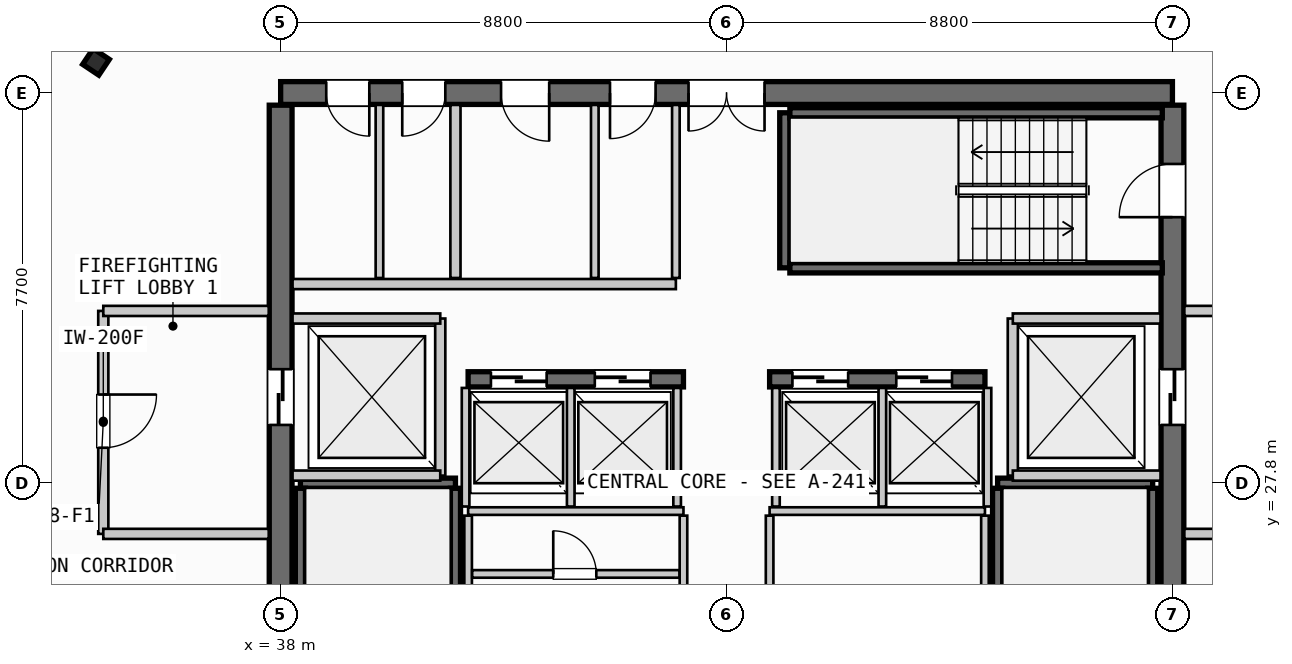
"""IFC4 building model, lengths in metres.
Left out: names, types, materials, properties, quantities, classifications, styles, units other than length and angle.
Written with IfcOpenShell. Run it as: python <this file> out.ifc"""

import sys

from ifc_helpers import new_model, si_unit, direction, frame, frame_2d, origin, origin_2d, place, context, subcontext, project, spatial, rectangle, i_section, extrude, source, transform, mapped, element, fill, save


model = new_model("IFC4")
c1 = context("Model", 3, precision=1e-05, world=origin(), true_north=direction((0.0, 1.0)))
c2 = subcontext(c1, "Body", "Model", "MODEL_VIEW")
j1 = project(units=[si_unit("LENGTHUNIT", "METRE"), si_unit("PLANEANGLEUNIT", "RADIAN")], contexts=[c1])
p1 = place(None, origin())
s1 = spatial("IfcSite", under=j1, at=p1, CompositionType="ELEMENT")
p2 = place(p1, origin())
s2 = spatial("IfcBuilding", under=s1, at=p2, CompositionType="ELEMENT")
p3 = place(p2, frame((0.0, 0.0, 293.95)))
s3 = spatial("IfcBuildingStorey", under=s2, at=p3, CompositionType="ELEMENT", Elevation=293.95)
p4 = place(p3, frame((55.6, 35.5, 0.0), z_axis=(0.0, 0.0, 1.0), x_axis=(-1.0, 0.0, 0.0)))
e1 = element("IfcWall", 1, at=p4, inside=s3, PredefinedType="SHEAR", context=c2, shape_type="SweptSolid", body=[
    extrude(rectangle(XDim=17.6, YDim=0.45, at=frame_2d((8.8, 0.0))), origin(), (0.0, 0.0, 1.0), 3.21),
])
p5 = place(p4, frame((8.05, 0.0, 0.0)))
e2 = element("IfcOpeningElement", 2, at=p5, cuts=e1, PredefinedType="OPENING", context=c2, shape_type="SweptSolid", body=[
    extrude(rectangle(XDim=1.5, YDim=2.2, at=frame_2d((0.75, 1.1))), frame((0.0, 0.235, 0.0), z_axis=(0.0, -1.0, 0.0), x_axis=(1.0, 0.0, 0.0)), (0.0, 0.0, 1.0), 0.47),
])
p6 = place(p4, frame((15.85, 0.0, 0.0)))
e3 = element("IfcOpeningElement", 3, at=p6, cuts=e1, PredefinedType="OPENING", context=c2, shape_type="SweptSolid", body=[
    extrude(rectangle(XDim=0.85, YDim=2.15, at=frame_2d((0.425, 1.075))), frame((0.0, 0.235, 0.0), z_axis=(0.0, -1.0, 0.0), x_axis=(1.0, 0.0, 0.0)), (0.0, 0.0, 1.0), 0.47),
])
p7 = place(p4, frame((14.35, 0.0, 0.0)))
e4 = element("IfcOpeningElement", 4, at=p7, cuts=e1, PredefinedType="OPENING", context=c2, shape_type="SweptSolid", body=[
    extrude(rectangle(XDim=0.85, YDim=2.15, at=frame_2d((0.425, 1.075))), frame((0.0, 0.235, 0.0), z_axis=(0.0, -1.0, 0.0), x_axis=(1.0, 0.0, 0.0)), (0.0, 0.0, 1.0), 0.47),
])
p8 = place(p4, frame((12.3, 0.0, 0.0)))
e5 = element("IfcOpeningElement", 5, at=p8, cuts=e1, PredefinedType="OPENING", context=c2, shape_type="SweptSolid", body=[
    extrude(rectangle(XDim=0.95, YDim=2.15, at=frame_2d((0.475, 1.075))), frame((0.0, 0.235, 0.0), z_axis=(0.0, -1.0, 0.0), x_axis=(1.0, 0.0, 0.0)), (0.0, 0.0, 1.0), 0.47),
])
p9 = place(p4, frame((10.2, 0.0, 0.0)))
e6 = element("IfcOpeningElement", 6, at=p9, cuts=e1, PredefinedType="OPENING", context=c2, shape_type="SweptSolid", body=[
    extrude(rectangle(XDim=0.9, YDim=2.15, at=frame_2d((0.45, 1.075))), frame((0.0, 0.235, 0.0), z_axis=(0.0, -1.0, 0.0), x_axis=(1.0, 0.0, 0.0)), (0.0, 0.0, 1.0), 0.47),
])
p10 = place(p3, frame((38.0, 35.26, 0.0), z_axis=(0.0, 0.0, 1.0), x_axis=(0.0, -1.0, 0.0)))
e7 = element("IfcWall", 7, at=p10, inside=s3, PredefinedType="SHEAR", context=c2, shape_type="SweptSolid", body=[
    extrude(rectangle(XDim=14.92, YDim=0.45, at=frame_2d((7.46, 0.0))), origin(), (0.0, 0.0, 1.0), 3.21),
])
p11 = place(p10, frame((5.21, 0.0, 0.0)))
e8 = element("IfcOpeningElement", 8, at=p11, cuts=e7, PredefinedType="OPENING", context=c2, shape_type="SweptSolid", body=[
    extrude(rectangle(XDim=1.1, YDim=2.2, at=frame_2d((0.55, 1.1))), frame((0.0, 0.235, 0.0), z_axis=(0.0, -1.0, 0.0), x_axis=(1.0, 0.0, 0.0)), (0.0, 0.0, 1.0), 0.47),
])
p12 = place(p3, frame((55.6, 20.34, 0.0), z_axis=(0.0, 0.0, 1.0), x_axis=(0.0, 1.0, 0.0)))
e9 = element("IfcWall", 9, at=p12, inside=s3, PredefinedType="SHEAR", context=c2, shape_type="SweptSolid", body=[
    extrude(rectangle(XDim=14.92, YDim=0.45, at=frame_2d((7.46, 0.0))), origin(), (0.0, 0.0, 1.0), 3.21),
])
p13 = place(p12, frame((12.71, 0.0, 0.0)))
e10 = element("IfcOpeningElement", 10, at=p13, cuts=e9, PredefinedType="OPENING", context=c2, shape_type="SweptSolid", body=[
    extrude(rectangle(XDim=1.05, YDim=2.15, at=frame_2d((0.525, 1.075))), frame((0.0, 0.235, 0.0), z_axis=(0.0, -1.0, 0.0), x_axis=(1.0, 0.0, 0.0)), (0.0, 0.0, 1.0), 0.47),
])
p14 = place(p12, frame((8.61, 0.0, 0.0)))
e11 = element("IfcOpeningElement", 11, at=p14, cuts=e9, PredefinedType="OPENING", context=c2, shape_type="SweptSolid", body=[
    extrude(rectangle(XDim=1.1, YDim=2.2, at=frame_2d((0.55, 1.1))), frame((0.0, 0.235, 0.0), z_axis=(0.0, -1.0, 0.0), x_axis=(1.0, 0.0, 0.0)), (0.0, 0.0, 1.0), 0.47),
])
p15 = place(p3, frame((41.7, 29.85, 0.0), z_axis=(0.0, 0.0, 1.0), x_axis=(1.0, 0.0, 0.0)))
e12 = element("IfcWall", 12, at=p15, inside=s3, PredefinedType="SHEAR", context=c2, shape_type="SweptSolid", body=[
    extrude(rectangle(XDim=4.25, YDim=0.3, at=frame_2d((2.125, 0.0))), origin(), (0.0, 0.0, 1.0), 3.21),
])
p16 = place(p15, frame((0.45, 0.0, 0.0)))
e13 = element("IfcOpeningElement", 13, at=p16, cuts=e12, PredefinedType="OPENING", context=c2, shape_type="SweptSolid", body=[
    extrude(rectangle(XDim=1.1, YDim=2.2, at=frame_2d((0.55, 1.1))), frame((0.0, 0.16, 0.0), z_axis=(0.0, -1.0, 0.0), x_axis=(1.0, 0.0, 0.0)), (0.0, 0.0, 1.0), 0.32),
])
p17 = place(p15, frame((2.5, 0.0, 0.0)))
e14 = element("IfcOpeningElement", 14, at=p17, cuts=e12, PredefinedType="OPENING", context=c2, shape_type="SweptSolid", body=[
    extrude(rectangle(XDim=1.1, YDim=2.2, at=frame_2d((0.55, 1.1))), frame((0.0, 0.16, 0.0), z_axis=(0.0, -1.0, 0.0), x_axis=(1.0, 0.0, 0.0)), (0.0, 0.0, 1.0), 0.32),
])
p18 = place(p3, frame((47.65, 29.85, 0.0), z_axis=(0.0, 0.0, 1.0), x_axis=(1.0, 0.0, 0.0)))
e15 = element("IfcWall", 15, at=p18, inside=s3, PredefinedType="SHEAR", context=c2, shape_type="SweptSolid", body=[
    extrude(rectangle(XDim=4.25, YDim=0.3, at=frame_2d((2.125, 0.0))), origin(), (0.0, 0.0, 1.0), 3.21),
])
p19 = place(p18, frame((0.45, 0.0, 0.0)))
e16 = element("IfcOpeningElement", 16, at=p19, cuts=e15, PredefinedType="OPENING", context=c2, shape_type="SweptSolid", body=[
    extrude(rectangle(XDim=1.1, YDim=2.2, at=frame_2d((0.55, 1.1))), frame((0.0, 0.16, 0.0), z_axis=(0.0, -1.0, 0.0), x_axis=(1.0, 0.0, 0.0)), (0.0, 0.0, 1.0), 0.32),
])
p20 = place(p18, frame((2.5, 0.0, 0.0)))
e17 = element("IfcOpeningElement", 17, at=p20, cuts=e15, PredefinedType="OPENING", context=c2, shape_type="SweptSolid", body=[
    extrude(rectangle(XDim=1.1, YDim=2.2, at=frame_2d((0.55, 1.1))), frame((0.0, 0.16, 0.0), z_axis=(0.0, -1.0, 0.0), x_axis=(1.0, 0.0, 0.0)), (0.0, 0.0, 1.0), 0.32),
])
m1 = source(origin(), c2, "Body", "SweptSolid", [
    extrude(i_section(OverallWidth=0.374, OverallDepth=0.383, WebThickness=0.017, FlangeThickness=0.026, FilletRadius=0.015, at=origin_2d()), origin(), (0.0, 0.0, 1.0), 3.21),
])
p21 = place(p3, frame((34.356, 36.115, 0.0), z_axis=(0.0, 0.0, 1.0), x_axis=(-0.831469612303, 0.55557023302, 0.0)))
e18 = element("IfcColumn", 18, at=p21, inside=s3, PredefinedType="COLUMN", context=c2, shape_type="MappedRepresentation", body=[
    mapped(m1, transform((0.0, 0.0, 0.0), scale=1.0)),
])
p22 = place(p3, frame((38.39, 27.8, 0.0), z_axis=(0.0, 0.0, 1.0), x_axis=(1.0, 0.0, 0.0)))
e19 = element("IfcWall", 19, at=p22, inside=s3, PredefinedType="SHEAR", context=c2, shape_type="SweptSolid", body=[
    extrude(rectangle(XDim=3.06, YDim=0.2, at=frame_2d((1.53, 0.0))), origin(), (0.0, 0.0, 1.0), 3.21),
])
for number, where, z_axis, x_axis in (
    (20, (41.45, 27.7, 0.0), (0.0, 0.0, 1.0), (0.0, -1.0, 0.0)),
    (21, (38.39, 20.35, 0.0), (0.0, 0.0, 1.0), (0.0, 1.0, 0.0)),
):
    element("IfcWall", number, at=place(p3, frame(where, z_axis=z_axis, x_axis=x_axis)), inside=s3, PredefinedType="SHEAR", context=c2, shape_type="SweptSolid", body=[
        extrude(rectangle(XDim=7.35, YDim=0.2, at=frame_2d((3.675, 0.0))), origin(), (0.0, 0.0, 1.0), 3.21),
    ])
p23 = place(p3, frame((52.15, 27.8, 0.0), z_axis=(0.0, 0.0, 1.0), x_axis=(1.0, 0.0, 0.0)))
e22 = element("IfcWall", 22, at=p23, inside=s3, PredefinedType="SHEAR", context=c2, shape_type="SweptSolid", body=[
    extrude(rectangle(XDim=3.06, YDim=0.2, at=frame_2d((1.53, 0.0))), origin(), (0.0, 0.0, 1.0), 3.21),
])
for number, where, z_axis, x_axis in (
    (23, (55.21, 27.7, 0.0), (0.0, 0.0, 1.0), (0.0, -1.0, 0.0)),
    (24, (52.15, 20.35, 0.0), (0.0, 0.0, 1.0), (0.0, 1.0, 0.0)),
):
    element("IfcWall", number, at=place(p3, frame(where, z_axis=z_axis, x_axis=x_axis)), inside=s3, PredefinedType="SHEAR", context=c2, shape_type="SweptSolid", body=[
        extrude(rectangle(XDim=7.35, YDim=0.2, at=frame_2d((3.675, 0.0))), origin(), (0.0, 0.0, 1.0), 3.21),
    ])
p24 = place(p3, frame((47.95, 32.05, 0.0), z_axis=(0.0, 0.0, 1.0), x_axis=(0.0, 1.0, 0.0)))
e25 = element("IfcWall", 25, at=p24, inside=s3, PredefinedType="SHEAR", context=c2, shape_type="SweptSolid", body=[
    extrude(rectangle(XDim=3.06, YDim=0.2, at=frame_2d((1.53, 0.0))), origin(), (0.0, 0.0, 1.0), 3.21),
])
for number, where, z_axis, x_axis in (
    (26, (48.05, 35.11, 0.0), (0.0, 0.0, 1.0), (1.0, 0.0, 0.0)),
    (27, (55.4, 32.05, 0.0), (0.0, 0.0, 1.0), (-1.0, 0.0, 0.0)),
):
    element("IfcWall", number, at=place(p3, frame(where, z_axis=z_axis, x_axis=x_axis)), inside=s3, PredefinedType="SHEAR", context=c2, shape_type="SweptSolid", body=[
        extrude(rectangle(XDim=7.35, YDim=0.2, at=frame_2d((3.675, 0.0))), origin(), (0.0, 0.0, 1.0), 3.21),
    ])
p25 = place(p3, frame((41.15, 27.95, 0.0), z_axis=(0.0, 0.0, 1.0), x_axis=(0.0, 1.0, 0.0)))
e28 = element("IfcWall", 28, at=p25, inside=s3, PredefinedType="PARTITIONING", context=c2, shape_type="SweptSolid", body=[
    extrude(rectangle(XDim=3.1, YDim=0.2, at=frame_2d((1.55, 0.0))), origin(), (0.0, 0.0, 1.0), 2.315),
])
for number, where, z_axis, x_axis in (
    (29, (38.235, 27.95, 0.0), (0.0, 0.0, 1.0), (1.0, 0.0, 0.0)),
    (30, (38.235, 31.05, 0.0), (0.0, 0.0, 1.0), (1.0, 0.0, 0.0)),
):
    element("IfcWall", number, at=place(p3, frame(where, z_axis=z_axis, x_axis=x_axis)), inside=s3, PredefinedType="PARTITIONING", context=c2, shape_type="SweptSolid", body=[
        extrude(rectangle(XDim=2.915, YDim=0.2, at=frame_2d((1.458, 0.0))), origin(), (0.0, 0.0, 1.0), 2.315),
    ])
p26 = place(p3, frame((34.5, 31.2, 0.0), z_axis=(0.0, 0.0, 1.0), x_axis=(0.0, -1.0, 0.0)))
e31 = element("IfcWall", 31, at=p26, inside=s3, PredefinedType="PARTITIONING", context=c2, shape_type="SweptSolid", body=[
    extrude(rectangle(XDim=4.4, YDim=0.2, at=frame_2d((2.2, 0.0))), origin(), (0.0, 0.0, 1.0), 2.315),
])
p27 = place(p26, frame((1.65, 0.0, 0.0)))
e32 = element("IfcOpeningElement", 32, at=p27, cuts=e31, PredefinedType="OPENING", context=c2, shape_type="SweptSolid", body=[
    extrude(rectangle(XDim=1.05, YDim=2.15, at=frame_2d((0.525, 1.075))), frame((0.0, 0.11, 0.0), z_axis=(0.0, -1.0, 0.0), x_axis=(1.0, 0.0, 0.0)), (0.0, 0.0, 1.0), 0.22),
])
for number, where, z_axis, x_axis in (
    (33, (34.5, 26.8, 0.0), (0.0, 0.0, 1.0), (1.0, 0.0, 0.0)),
    (34, (34.5, 31.2, 0.0), (0.0, 0.0, 1.0), (1.0, 0.0, 0.0)),
):
    element("IfcWall", number, at=place(p3, frame(where, z_axis=z_axis, x_axis=x_axis)), inside=s3, PredefinedType="PARTITIONING", context=c2, shape_type="SweptSolid", body=[
        extrude(rectangle(XDim=3.265, YDim=0.2, at=frame_2d((1.632, 0.0))), origin(), (0.0, 0.0, 1.0), 2.315),
    ])
p28 = place(p3, frame((52.45, 27.95, 0.0), z_axis=(0.0, 0.0, 1.0), x_axis=(0.0, 1.0, 0.0)))
e35 = element("IfcWall", 35, at=p28, inside=s3, PredefinedType="PARTITIONING", context=c2, shape_type="SweptSolid", body=[
    extrude(rectangle(XDim=3.1, YDim=0.2, at=frame_2d((1.55, 0.0))), origin(), (0.0, 0.0, 1.0), 2.315),
])
for number, where, z_axis, x_axis in (
    (36, (52.45, 27.95, 0.0), (0.0, 0.0, 1.0), (1.0, 0.0, 0.0)),
    (37, (52.45, 31.05, 0.0), (0.0, 0.0, 1.0), (1.0, 0.0, 0.0)),
):
    element("IfcWall", number, at=place(p3, frame(where, z_axis=z_axis, x_axis=x_axis)), inside=s3, PredefinedType="PARTITIONING", context=c2, shape_type="SweptSolid", body=[
        extrude(rectangle(XDim=2.915, YDim=0.2, at=frame_2d((1.458, 0.0))), origin(), (0.0, 0.0, 1.0), 2.315),
    ])
for number, where, z_axis, x_axis in (
    (38, (55.835, 26.8, 0.0), (0.0, 0.0, 1.0), (1.0, 0.0, 0.0)),
    (39, (55.835, 31.2, 0.0), (0.0, 0.0, 1.0), (1.0, 0.0, 0.0)),
):
    element("IfcWall", number, at=place(p3, frame(where, z_axis=z_axis, x_axis=x_axis)), inside=s3, PredefinedType="PARTITIONING", context=c2, shape_type="SweptSolid", body=[
        extrude(rectangle(XDim=3.265, YDim=0.2, at=frame_2d((1.633, 0.0))), origin(), (0.0, 0.0, 1.0), 2.315),
    ])
for number, where, z_axis, x_axis in (
    (40, (41.7, 27.25, 0.0), (0.0, 0.0, 1.0), (1.0, 0.0, 0.0)),
    (41, (47.65, 27.25, 0.0), (0.0, 0.0, 1.0), (1.0, 0.0, 0.0)),
):
    element("IfcWall", number, at=place(p3, frame(where, z_axis=z_axis, x_axis=x_axis)), inside=s3, PredefinedType="PARTITIONING", context=c2, shape_type="SweptSolid", body=[
        extrude(rectangle(XDim=4.25, YDim=0.15, at=frame_2d((2.125, 0.0))), origin(), (0.0, 0.0, 1.0), 2.315),
    ])
for number, where, z_axis, x_axis in (
    (42, (41.7, 24.92, 0.0), (0.0, 0.0, 1.0), (0.0, 1.0, 0.0)),
    (43, (45.95, 24.92, 0.0), (0.0, 0.0, 1.0), (0.0, 1.0, 0.0)),
    (44, (47.65, 24.92, 0.0), (0.0, 0.0, 1.0), (0.0, 1.0, 0.0)),
    (45, (51.9, 24.92, 0.0), (0.0, 0.0, 1.0), (0.0, 1.0, 0.0)),
):
    element("IfcWall", number, at=place(p3, frame(where, z_axis=z_axis, x_axis=x_axis)), inside=s3, PredefinedType="PARTITIONING", context=c2, shape_type="SweptSolid", body=[
        extrude(rectangle(XDim=2.24, YDim=0.15, at=frame_2d((1.12, 0.0))), origin(), (0.0, 0.0, 1.0), 2.315),
    ])
p29 = place(p3, frame((41.78, 26.01, 0.0), z_axis=(0.0, 0.0, 1.0), x_axis=(1.0, 0.0, 0.0)))
e46 = element("IfcWall", 46, at=p29, inside=s3, PredefinedType="PARTITIONING", context=c2, shape_type="SweptSolid", body=[
    extrude(rectangle(XDim=4.09, YDim=0.15, at=frame_2d((2.045, 0.0))), origin(), (0.0, 0.0, 1.0), 2.315),
])
p30 = place(p29, frame((1.6, 0.0, 0.0)))
e47 = element("IfcOpeningElement", 47, at=p30, cuts=e46, PredefinedType="OPENING", context=c2, shape_type="SweptSolid", body=[
    extrude(rectangle(XDim=0.85, YDim=2.15, at=frame_2d((0.425, 1.075))), frame((0.0, 0.085, 0.0), z_axis=(0.0, -1.0, 0.0), x_axis=(1.0, 0.0, 0.0)), (0.0, 0.0, 1.0), 0.17),
])
for number, where, z_axis, x_axis in (
    (48, (41.65, 27.34, 0.0), (0.0, 0.0, 1.0), (0.0, 1.0, 0.0)),
    (49, (43.725, 27.34, 0.0), (0.0, 0.0, 1.0), (0.0, 1.0, 0.0)),
    (50, (45.825, 27.34, 0.0), (0.0, 0.0, 1.0), (0.0, 1.0, 0.0)),
    (51, (47.775, 27.34, 0.0), (0.0, 0.0, 1.0), (0.0, 1.0, 0.0)),
    (52, (49.875, 27.34, 0.0), (0.0, 0.0, 1.0), (0.0, 1.0, 0.0)),
    (53, (51.95, 27.34, 0.0), (0.0, 0.0, 1.0), (0.0, 1.0, 0.0)),
):
    element("IfcWall", number, at=place(p3, frame(where, z_axis=z_axis, x_axis=x_axis)), inside=s3, PredefinedType="PARTITIONING", context=c2, shape_type="SweptSolid", body=[
        extrude(rectangle(XDim=2.34, YDim=0.15, at=frame_2d((1.17, 0.0))), origin(), (0.0, 0.0, 1.0), 2.315),
    ])
p31 = place(p3, frame((41.45, 31.85, 0.0), z_axis=(0.0, 0.0, 1.0), x_axis=(0.0, 1.0, 0.0)))
e54 = element("IfcWall", 54, at=p31, inside=s3, PredefinedType="PARTITIONING", context=c2, shape_type="SweptSolid", body=[
    extrude(rectangle(XDim=3.415, YDim=0.2, at=frame_2d((1.708, 0.0))), origin(), (0.0, 0.0, 1.0), 2.315),
])
p32 = place(p3, frame((38.235, 31.73, 0.0), z_axis=(0.0, 0.0, 1.0), x_axis=(1.0, 0.0, 0.0)))
e55 = element("IfcWall", 55, at=p32, inside=s3, PredefinedType="PARTITIONING", context=c2, shape_type="SweptSolid", body=[
    extrude(rectangle(XDim=7.565, YDim=0.2, at=frame_2d((3.782, 0.0))), origin(), (0.0, 0.0, 1.0), 2.315),
])
for number, where, z_axis, x_axis in (
    (56, (45.8, 31.85, 0.0), (0.0, 0.0, 1.0), (0.0, 1.0, 0.0)),
    (57, (39.95, 31.85, 0.0), (0.0, 0.0, 1.0), (0.0, 1.0, 0.0)),
):
    element("IfcWall", number, at=place(p3, frame(where, z_axis=z_axis, x_axis=x_axis)), inside=s3, PredefinedType="PARTITIONING", context=c2, shape_type="SweptSolid", body=[
        extrude(rectangle(XDim=3.415, YDim=0.15, at=frame_2d((1.708, 0.0))), origin(), (0.0, 0.0, 1.0), 2.315),
    ])
p33 = place(p3, frame((44.2, 31.85, 0.0), z_axis=(0.0, 0.0, 1.0), x_axis=(0.0, 1.0, 0.0)))
e58 = element("IfcWall", 58, at=p33, inside=s3, PredefinedType="PLUMBINGWALL", context=c2, shape_type="SweptSolid", body=[
    extrude(rectangle(XDim=3.415, YDim=0.15, at=frame_2d((1.708, 0.0))), origin(), (0.0, 0.0, 1.0), 2.315),
])
m2 = source(origin(), c2, "Body", "SweptSolid", [
    extrude(rectangle(XDim=1.05, YDim=2.15, at=frame_2d((0.525, 1.075))), frame((0.0, 0.025, 0.0), z_axis=(0.0, -1.0, 0.0), x_axis=(1.0, 0.0, 0.0)), (0.0, 0.0, 1.0), 0.05),
])
p34 = place(p13, origin())
e59 = element("IfcDoor", 59, at=p34, inside=s3, OperationType="SINGLE_SWING_LEFT", PredefinedType="DOOR", context=c2, shape_type="MappedRepresentation", body=[
    mapped(m2, transform((0.0, 0.0, 0.0), scale=1.0)),
])
fill(e10, e59)
m3 = source(origin(), c2, "Body", "SweptSolid", [
    extrude(rectangle(XDim=1.5, YDim=2.2, at=frame_2d((0.75, 1.1))), frame((0.0, 0.025, 0.0), z_axis=(0.0, -1.0, 0.0), x_axis=(1.0, 0.0, 0.0)), (0.0, 0.0, 1.0), 0.05),
])
p35 = place(p5, origin())
e60 = element("IfcDoor", 60, at=p35, inside=s3, OperationType="DOUBLE_DOOR_SINGLE_SWING", PredefinedType="DOOR", context=c2, shape_type="MappedRepresentation", body=[
    mapped(m3, transform((0.0, 0.0, 0.0), scale=1.0)),
])
fill(e2, e60)
m4 = source(origin(), c2, "Body", "SweptSolid", [
    extrude(rectangle(XDim=1.1, YDim=2.2, at=frame_2d((0.55, 1.1))), frame((0.0, 0.025, 0.0), z_axis=(0.0, -1.0, 0.0), x_axis=(1.0, 0.0, 0.0)), (0.0, 0.0, 1.0), 0.05),
])
p36 = place(p11, origin())
e61 = element("IfcDoor", 61, at=p36, inside=s3, OperationType="SLIDING_TO_LEFT", PredefinedType="DOOR", context=c2, shape_type="MappedRepresentation", body=[
    mapped(m4, transform((0.0, 0.0, 0.0), scale=1.0)),
])
fill(e8, e61)
p37 = place(p14, origin())
e62 = element("IfcDoor", 62, at=p37, inside=s3, OperationType="SLIDING_TO_RIGHT", PredefinedType="DOOR", context=c2, shape_type="MappedRepresentation", body=[
    mapped(m4, transform((0.0, 0.0, 0.0), scale=1.0)),
])
fill(e11, e62)
p38 = place(p16, origin())
e63 = element("IfcDoor", 63, at=p38, inside=s3, OperationType="SLIDING_TO_LEFT", PredefinedType="DOOR", context=c2, shape_type="MappedRepresentation", body=[
    mapped(m4, transform((0.0, 0.0, 0.0), scale=1.0)),
])
fill(e13, e63)
p39 = place(p17, origin())
e64 = element("IfcDoor", 64, at=p39, inside=s3, OperationType="SLIDING_TO_LEFT", PredefinedType="DOOR", context=c2, shape_type="MappedRepresentation", body=[
    mapped(m4, transform((0.0, 0.0, 0.0), scale=1.0)),
])
fill(e14, e64)
p40 = place(p19, origin())
e65 = element("IfcDoor", 65, at=p40, inside=s3, OperationType="SLIDING_TO_LEFT", PredefinedType="DOOR", context=c2, shape_type="MappedRepresentation", body=[
    mapped(m4, transform((0.0, 0.0, 0.0), scale=1.0)),
])
fill(e16, e65)
p41 = place(p20, origin())
e66 = element("IfcDoor", 66, at=p41, inside=s3, OperationType="SLIDING_TO_LEFT", PredefinedType="DOOR", context=c2, shape_type="MappedRepresentation", body=[
    mapped(m4, transform((0.0, 0.0, 0.0), scale=1.0)),
])
fill(e17, e66)
m5 = source(origin(), c2, "Body", "SweptSolid", [
    extrude(rectangle(XDim=0.85, YDim=2.15, at=frame_2d((0.425, 1.075))), frame((0.0, 0.025, 0.0), z_axis=(0.0, -1.0, 0.0), x_axis=(1.0, 0.0, 0.0)), (0.0, 0.0, 1.0), 0.05),
])
p42 = place(p6, origin())
e67 = element("IfcDoor", 67, at=p42, inside=s3, OperationType="SINGLE_SWING_LEFT", PredefinedType="DOOR", context=c2, shape_type="MappedRepresentation", body=[
    mapped(m5, transform((0.0, 0.0, 0.0), scale=1.0)),
])
fill(e3, e67)
p43 = place(p7, origin())
e68 = element("IfcDoor", 68, at=p43, inside=s3, OperationType="SINGLE_SWING_RIGHT", PredefinedType="DOOR", context=c2, shape_type="MappedRepresentation", body=[
    mapped(m5, transform((0.0, 0.0, 0.0), scale=1.0)),
])
fill(e4, e68)
m6 = source(origin(), c2, "Body", "SweptSolid", [
    extrude(rectangle(XDim=0.95, YDim=2.15, at=frame_2d((0.475, 1.075))), frame((0.0, 0.025, 0.0), z_axis=(0.0, -1.0, 0.0), x_axis=(1.0, 0.0, 0.0)), (0.0, 0.0, 1.0), 0.05),
])
p44 = place(p8, origin())
e69 = element("IfcDoor", 69, at=p44, inside=s3, OperationType="SINGLE_SWING_LEFT", PredefinedType="DOOR", context=c2, shape_type="MappedRepresentation", body=[
    mapped(m6, transform((0.0, 0.0, 0.0), scale=1.0)),
])
fill(e5, e69)
m7 = source(origin(), c2, "Body", "SweptSolid", [
    extrude(rectangle(XDim=0.9, YDim=2.15, at=frame_2d((0.45, 1.075))), frame((0.0, 0.025, 0.0), z_axis=(0.0, -1.0, 0.0), x_axis=(1.0, 0.0, 0.0)), (0.0, 0.0, 1.0), 0.05),
])
p45 = place(p9, origin())
e70 = element("IfcDoor", 70, at=p45, inside=s3, OperationType="SINGLE_SWING_RIGHT", PredefinedType="DOOR", context=c2, shape_type="MappedRepresentation", body=[
    mapped(m7, transform((0.0, 0.0, 0.0), scale=1.0)),
])
fill(e6, e70)
p46 = place(p27, origin())
e71 = element("IfcDoor", 71, at=p46, inside=s3, OperationType="SINGLE_SWING_LEFT", PredefinedType="DOOR", context=c2, shape_type="MappedRepresentation", body=[
    mapped(m2, transform((0.0, 0.0, 0.0), scale=1.0)),
])
fill(e32, e71)
p47 = place(p30, origin())
e72 = element("IfcDoor", 72, at=p47, inside=s3, OperationType="SINGLE_SWING_LEFT", PredefinedType="DOOR", context=c2, shape_type="MappedRepresentation", body=[
    mapped(m5, transform((0.0, 0.0, 0.0), scale=1.0)),
])
fill(e47, e72)
save(model, sys.argv[1])
